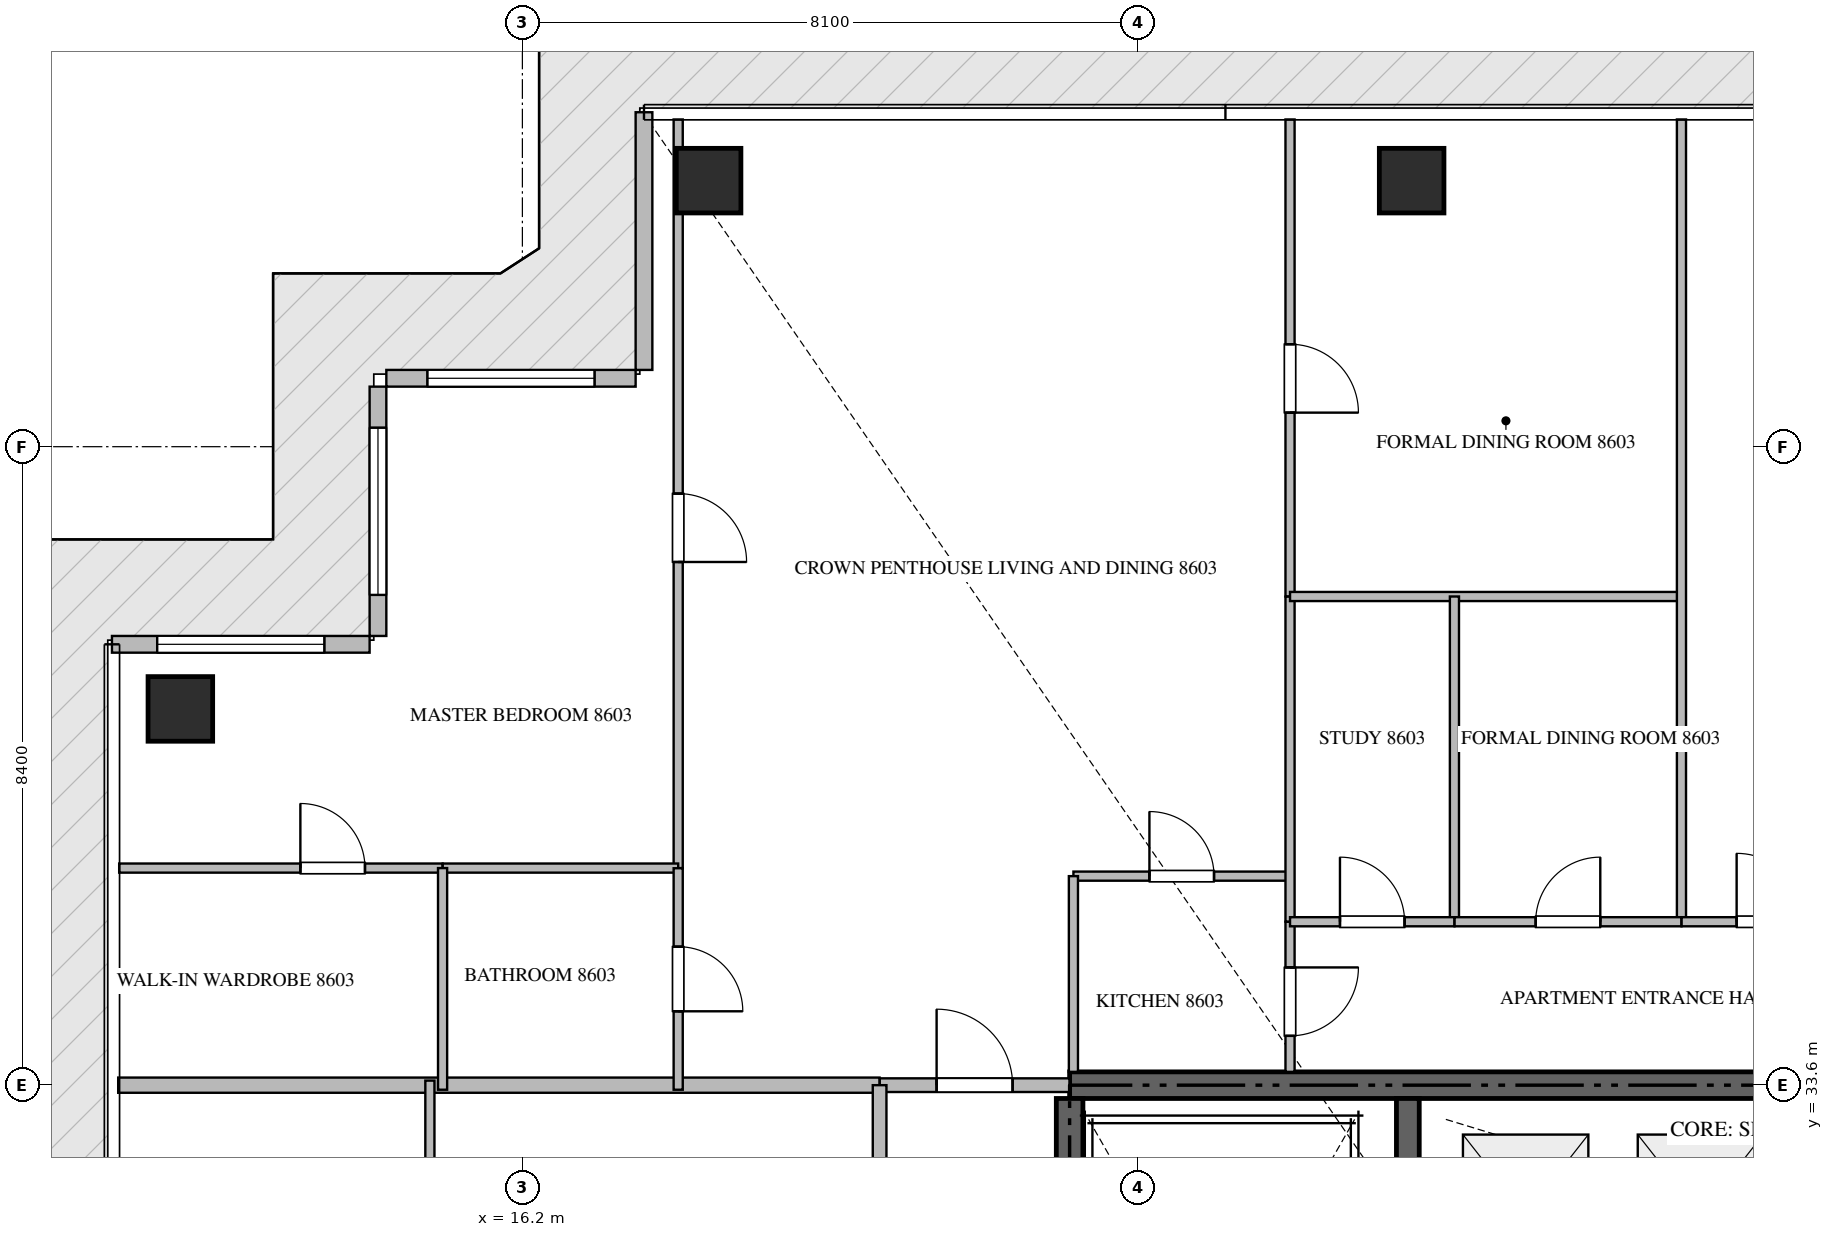
"""IFC4 building model, lengths in metres.
Left out: names, types, materials, properties, quantities, classifications, styles, units other than length and angle.
Written with IfcOpenShell. Run it as: python <this file> out.ifc"""

import sys

from ifc_helpers import new_model, si_unit, direction, frame, frame_2d, origin, origin_2d, place, context, subcontext, project, spatial, rectangle, extrude, source, transform, mapped, element, fill, save


model = new_model("IFC4")
c1 = context("Model", 3, precision=1e-05, world=origin(), true_north=direction((0.0, 1.0)))
c2 = subcontext(c1, "Body", "Model", "MODEL_VIEW")
j1 = project(units=[si_unit("LENGTHUNIT", "METRE"), si_unit("PLANEANGLEUNIT", "RADIAN")], contexts=[c1])
p1 = place(None, origin())
s1 = spatial("IfcSite", under=j1, at=p1, CompositionType="ELEMENT")
p2 = place(p1, origin())
s2 = spatial("IfcBuilding", under=s1, at=p2, CompositionType="ELEMENT")
p3 = place(p2, frame((0.0, 0.0, 347.95)))
s3 = spatial("IfcBuildingStorey", under=s2, at=p3, CompositionType="ELEMENT", Elevation=347.95)
p4 = place(p3, frame((41.4, 33.6, -0.26), z_axis=(0.0, 0.0, 1.0), x_axis=(-1.0, 0.0, 0.0)))
e1 = element("IfcWall", 1, at=p4, inside=s3, PredefinedType="SHEAR", context=c2, shape_type="SweptSolid", body=[
    extrude(rectangle(XDim=18.0, YDim=0.35, at=frame_2d((9.0, 0.0))), origin(), (0.0, 0.0, 1.0), 5.898),
])
p5 = place(p3, frame((23.4, 24.25, -0.26), z_axis=(0.0, 0.0, 1.0), x_axis=(0.0, 1.0, 0.0)))
e2 = element("IfcWall", 2, at=p5, inside=s3, PredefinedType="SHEAR", context=c2, shape_type="SweptSolid", body=[
    extrude(rectangle(XDim=9.175, YDim=0.35, at=frame_2d((4.587, 0.0))), origin(), (0.0, 0.0, 1.0), 5.898),
])
p6 = place(p3, frame((27.85, 23.55, -0.26), z_axis=(0.0, 0.0, 1.0), x_axis=(0.0, 1.0, 0.0)))
e3 = element("IfcWall", 3, at=p6, inside=s3, PredefinedType="SHEAR", context=c2, shape_type="SweptSolid", body=[
    extrude(rectangle(XDim=9.875, YDim=0.3, at=frame_2d((4.938, 0.0))), origin(), (0.0, 0.0, 1.0), 5.898),
])
m1 = source(origin(), c2, "Body", "SweptSolid", [
    extrude(rectangle(XDim=0.85, YDim=0.85, at=origin_2d()), origin(), (0.0, 0.0, 1.0), 5.9),
])
for number, where, z_axis, x_axis in (
    (4, (18.65, 45.5, -0.26), (0.0, 0.0, 1.0), (1.0, 0.0, 0.0)),
    (5, (27.9, 45.5, -0.26), (0.0, 0.0, 1.0), (1.0, 0.0, 0.0)),
    (6, (11.7, 38.55, -0.26), (0.0, 0.0, 1.0), (1.0, 0.0, 0.0)),
):
    element("IfcColumn", number, at=place(p3, frame(where, z_axis=z_axis, x_axis=x_axis)), inside=s3, PredefinedType="COLUMN", context=c2, shape_type="MappedRepresentation", body=[
        mapped(m1, transform((0.0, 0.0, 0.0), scale=1.0)),
    ])
p7 = place(p3, frame((17.8, 46.4, 0.0), z_axis=(0.0, 0.0, 1.0), x_axis=(0.0, -1.0, 0.0)))
e7 = element("IfcWall", 7, at=p7, inside=s3, PredefinedType="ELEMENTEDWALL", context=c2, shape_type="SweptSolid", body=[
    extrude(rectangle(XDim=3.39, YDim=0.22, at=frame_2d((1.695, 0.0))), origin(), (0.0, 0.0, 1.0), 5.625),
])
p8 = place(p3, frame((17.69, 42.9, 0.0), z_axis=(0.0, 0.0, 1.0), x_axis=(-1.0, 0.0, 0.0)))
e8 = element("IfcWall", 8, at=p8, inside=s3, PredefinedType="ELEMENTEDWALL", context=c2, shape_type="SweptSolid", body=[
    extrude(rectangle(XDim=3.28, YDim=0.22, at=frame_2d((1.64, 0.0))), origin(), (0.0, 0.0, 1.0), 5.625),
])
p9 = place(p8, frame((0.54, 0.0, 0.65)))
e9 = element("IfcOpeningElement", 9, at=p9, cuts=e8, PredefinedType="OPENING", context=c2, shape_type="SweptSolid", body=[
    extrude(rectangle(XDim=2.2, YDim=2.4, at=frame_2d((1.1, 1.2))), frame((0.0, 0.12, 0.0), z_axis=(0.0, -1.0, 0.0), x_axis=(1.0, 0.0, 0.0)), (0.0, 0.0, 1.0), 0.24),
])
p10 = place(p3, frame((14.3, 42.79, 0.0), z_axis=(0.0, 0.0, 1.0), x_axis=(0.0, -1.0, 0.0)))
e10 = element("IfcWall", 10, at=p10, inside=s3, PredefinedType="ELEMENTEDWALL", context=c2, shape_type="SweptSolid", body=[
    extrude(rectangle(XDim=3.28, YDim=0.22, at=frame_2d((1.64, 0.0))), origin(), (0.0, 0.0, 1.0), 5.625),
])
p11 = place(p10, frame((0.54, 0.0, 0.65)))
e11 = element("IfcOpeningElement", 11, at=p11, cuts=e10, PredefinedType="OPENING", context=c2, shape_type="SweptSolid", body=[
    extrude(rectangle(XDim=2.2, YDim=2.4, at=frame_2d((1.1, 1.2))), frame((0.0, 0.12, 0.0), z_axis=(0.0, -1.0, 0.0), x_axis=(1.0, 0.0, 0.0)), (0.0, 0.0, 1.0), 0.24),
])
p12 = place(p3, frame((14.19, 39.4, 0.0), z_axis=(0.0, 0.0, 1.0), x_axis=(-1.0, 0.0, 0.0)))
e12 = element("IfcWall", 12, at=p12, inside=s3, PredefinedType="ELEMENTEDWALL", context=c2, shape_type="SweptSolid", body=[
    extrude(rectangle(XDim=3.39, YDim=0.22, at=frame_2d((1.695, 0.0))), origin(), (0.0, 0.0, 1.0), 5.625),
])
p13 = place(p12, frame((0.595, 0.0, 0.65)))
e13 = element("IfcOpeningElement", 13, at=p13, cuts=e12, PredefinedType="OPENING", context=c2, shape_type="SweptSolid", body=[
    extrude(rectangle(XDim=2.2, YDim=2.4, at=frame_2d((1.1, 1.2))), frame((0.0, 0.12, 0.0), z_axis=(0.0, -1.0, 0.0), x_axis=(1.0, 0.0, 0.0)), (0.0, 0.0, 1.0), 0.24),
])
p14 = place(p3, frame((10.882, 33.6, 0.0), z_axis=(0.0, 0.0, 1.0), x_axis=(1.0, 0.0, 0.0)))
e14 = element("IfcWall", 14, at=p14, inside=s3, PredefinedType="PARTITIONING", context=c2, shape_type="SweptSolid", body=[
    extrude(rectangle(XDim=10.018, YDim=0.2, at=frame_2d((5.009, 0.0))), origin(), (0.0, 0.0, 1.0), 5.64),
])
p15 = place(p3, frame((20.902, 33.6, 0.0), z_axis=(0.0, 0.0, 1.0), x_axis=(1.0, 0.0, 0.0)))
e15 = element("IfcWall", 15, at=p15, inside=s3, PredefinedType="PARTITIONING", context=c2, shape_type="SweptSolid", body=[
    extrude(rectangle(XDim=2.496, YDim=0.18, at=frame_2d((1.248, 0.0))), origin(), (0.0, 0.0, 1.0), 5.64),
])
p16 = place(p15, frame((0.748, 0.0, 0.0)))
e16 = element("IfcOpeningElement", 16, at=p16, cuts=e15, PredefinedType="OPENING", context=c2, shape_type="SweptSolid", body=[
    extrude(rectangle(XDim=1.0, YDim=2.15, at=frame_2d((0.5, 1.075))), frame((0.0, 0.1, 0.0), z_axis=(0.0, -1.0, 0.0), x_axis=(1.0, 0.0, 0.0)), (0.0, 0.0, 1.0), 0.2),
])
p17 = place(p3, frame((20.9, 16.8, 0.0), z_axis=(0.0, 0.0, 1.0), x_axis=(0.0, 1.0, 0.0)))
e17 = element("IfcWall", 17, at=p17, inside=s3, PredefinedType="PARTITIONING", context=c2, shape_type="SweptSolid", body=[
    extrude(rectangle(XDim=16.8, YDim=0.18, at=frame_2d((8.4, 0.0))), origin(), (0.0, 0.0, 1.0), 5.64),
])
p18 = place(p17, frame((1.3, 0.0, 0.0)))
e18 = element("IfcOpeningElement", 18, at=p18, cuts=e17, PredefinedType="OPENING", context=c2, shape_type="SweptSolid", body=[
    extrude(rectangle(XDim=1.0, YDim=2.15, at=frame_2d((0.5, 1.075))), frame((0.0, 0.1, 0.0), z_axis=(0.0, -1.0, 0.0), x_axis=(1.0, 0.0, 0.0)), (0.0, 0.0, 1.0), 0.2),
])
p19 = place(p3, frame((23.45, 36.35, 0.0), z_axis=(0.0, 0.0, 1.0), x_axis=(1.0, 0.0, 0.0)))
e19 = element("IfcWall", 19, at=p19, inside=s3, PredefinedType="PARTITIONING", context=c2, shape_type="SweptSolid", body=[
    extrude(rectangle(XDim=2.85, YDim=0.12, at=frame_2d((1.425, 0.0))), origin(), (0.0, 0.0, 1.0), 5.64),
])
p20 = place(p19, frame((1.0, 0.0, 0.0)))
e20 = element("IfcOpeningElement", 20, at=p20, cuts=e19, PredefinedType="OPENING", context=c2, shape_type="SweptSolid", body=[
    extrude(rectangle(XDim=0.85, YDim=2.1, at=frame_2d((0.425, 1.05))), frame((0.0, 0.07, 0.0), z_axis=(0.0, -1.0, 0.0), x_axis=(1.0, 0.0, 0.0)), (0.0, 0.0, 1.0), 0.14),
])
p21 = place(p3, frame((23.45, 36.35, 0.0), z_axis=(0.0, 0.0, 1.0), x_axis=(0.0, -1.0, 0.0)))
e21 = element("IfcWall", 21, at=p21, inside=s3, PredefinedType="PARTITIONING", context=c2, shape_type="SweptSolid", body=[
    extrude(rectangle(XDim=2.575, YDim=0.12, at=frame_2d((1.288, 0.0))), origin(), (0.0, 0.0, 1.0), 5.64),
])
p22 = place(p3, frame((18.25, 46.305, 0.0), z_axis=(0.0, 0.0, 1.0), x_axis=(0.0, -1.0, 0.0)))
e22 = element("IfcWall", 22, at=p22, inside=s3, PredefinedType="PARTITIONING", context=c2, shape_type="SweptSolid", body=[
    extrude(rectangle(XDim=9.849, YDim=0.12, at=frame_2d((4.924, 0.0))), origin(), (0.0, 0.0, 1.0), 5.64),
])
p23 = place(p22, frame((4.922, 0.0, 0.0)))
e23 = element("IfcOpeningElement", 23, at=p23, cuts=e22, PredefinedType="OPENING", context=c2, shape_type="SweptSolid", body=[
    extrude(rectangle(XDim=0.9, YDim=2.1, at=frame_2d((0.45, 1.05))), frame((0.0, 0.07, 0.0), z_axis=(0.0, -1.0, 0.0), x_axis=(1.0, 0.0, 0.0)), (0.0, 0.0, 1.0), 0.14),
])
p24 = place(p3, frame((10.895, 36.456, 0.0), z_axis=(0.0, 0.0, 1.0), x_axis=(1.0, 0.0, 0.0)))
e24 = element("IfcWall", 24, at=p24, inside=s3, PredefinedType="PARTITIONING", context=c2, shape_type="SweptSolid", body=[
    extrude(rectangle(XDim=4.255, YDim=0.12, at=frame_2d((2.127, 0.0))), origin(), (0.0, 0.0, 1.0), 5.64),
])
p25 = place(p24, frame((2.384, 0.0, 0.0)))
e25 = element("IfcOpeningElement", 25, at=p25, cuts=e24, PredefinedType="OPENING", context=c2, shape_type="SweptSolid", body=[
    extrude(rectangle(XDim=0.85, YDim=2.1, at=frame_2d((0.425, 1.05))), frame((0.0, 0.07, 0.0), z_axis=(0.0, -1.0, 0.0), x_axis=(1.0, 0.0, 0.0)), (0.0, 0.0, 1.0), 0.14),
])
p26 = place(p3, frame((15.152, 36.456, 0.0), z_axis=(0.0, 0.0, 1.0), x_axis=(1.0, 0.0, 0.0)))
e26 = element("IfcWall", 26, at=p26, inside=s3, PredefinedType="PARTITIONING", context=c2, shape_type="SweptSolid", body=[
    extrude(rectangle(XDim=3.098, YDim=0.12, at=frame_2d((1.549, 0.0))), origin(), (0.0, 0.0, 1.0), 5.64),
])
p27 = place(p3, frame((15.15, 36.456, 0.0), z_axis=(0.0, 0.0, 1.0), x_axis=(0.0, -1.0, 0.0)))
e27 = element("IfcWall", 27, at=p27, inside=s3, PredefinedType="PARTITIONING", context=c2, shape_type="SweptSolid", body=[
    extrude(rectangle(XDim=2.916, YDim=0.12, at=frame_2d((1.458, 0.0))), origin(), (0.0, 0.0, 1.0), 5.64),
])
p28 = place(p3, frame((18.25, 36.454, 0.0), z_axis=(0.0, 0.0, 1.0), x_axis=(0.0, -1.0, 0.0)))
e28 = element("IfcWall", 28, at=p28, inside=s3, PredefinedType="PARTITIONING", context=c2, shape_type="SweptSolid", body=[
    extrude(rectangle(XDim=2.914, YDim=0.12, at=frame_2d((1.457, 0.0))), origin(), (0.0, 0.0, 1.0), 5.64),
])
p29 = place(p28, frame((1.032, 0.0, 0.0)))
e29 = element("IfcOpeningElement", 29, at=p29, cuts=e28, PredefinedType="OPENING", context=c2, shape_type="SweptSolid", body=[
    extrude(rectangle(XDim=0.85, YDim=2.1, at=frame_2d((0.425, 1.05))), frame((0.0, 0.07, 0.0), z_axis=(0.0, -1.0, 0.0), x_axis=(1.0, 0.0, 0.0)), (0.0, 0.0, 1.0), 0.14),
])
p30 = place(p3, frame((26.3, 35.75, 0.0), z_axis=(0.0, 0.0, 1.0), x_axis=(0.0, -1.0, 0.0)))
e30 = element("IfcWall", 30, at=p30, inside=s3, PredefinedType="PARTITIONING", context=c2, shape_type="SweptSolid", body=[
    extrude(rectangle(XDim=1.975, YDim=0.12, at=frame_2d((0.988, 0.0))), origin(), (0.0, 0.0, 1.0), 5.64),
])
p31 = place(p30, frame((0.601, 0.0, 0.0)))
e31 = element("IfcOpeningElement", 31, at=p31, cuts=e30, PredefinedType="OPENING", context=c2, shape_type="SweptSolid", body=[
    extrude(rectangle(XDim=0.9, YDim=2.1, at=frame_2d((0.45, 1.05))), frame((0.0, 0.07, 0.0), z_axis=(0.0, -1.0, 0.0), x_axis=(1.0, 0.0, 0.0)), (0.0, 0.0, 1.0), 0.14),
])
p32 = place(p3, frame((26.3, 46.305, 0.0), z_axis=(0.0, 0.0, 1.0), x_axis=(0.0, -1.0, 0.0)))
e32 = element("IfcWall", 32, at=p32, inside=s3, PredefinedType="PARTITIONING", context=c2, shape_type="SweptSolid", body=[
    extrude(rectangle(XDim=6.276, YDim=0.12, at=frame_2d((3.138, 0.0))), origin(), (0.0, 0.0, 1.0), 5.64),
])
p33 = place(p32, frame((2.957, 0.0, 0.0)))
e33 = element("IfcOpeningElement", 33, at=p33, cuts=e32, PredefinedType="OPENING", context=c2, shape_type="SweptSolid", body=[
    extrude(rectangle(XDim=0.9, YDim=2.1, at=frame_2d((0.45, 1.05))), frame((0.0, 0.07, 0.0), z_axis=(0.0, -1.0, 0.0), x_axis=(1.0, 0.0, 0.0)), (0.0, 0.0, 1.0), 0.14),
])
p34 = place(p3, frame((26.3, 40.027, 0.0), z_axis=(0.0, 0.0, 1.0), x_axis=(0.0, -1.0, 0.0)))
e34 = element("IfcWall", 34, at=p34, inside=s3, PredefinedType="PARTITIONING", context=c2, shape_type="SweptSolid", body=[
    extrude(rectangle(XDim=4.275, YDim=0.12, at=frame_2d((2.138, 0.0))), origin(), (0.0, 0.0, 1.0), 5.64),
])
p35 = place(p3, frame((26.3, 40.029, 0.0), z_axis=(0.0, 0.0, 1.0), x_axis=(1.0, 0.0, 0.0)))
e35 = element("IfcWall", 35, at=p35, inside=s3, PredefinedType="PARTITIONING", context=c2, shape_type="SweptSolid", body=[
    extrude(rectangle(XDim=5.15, YDim=0.12, at=frame_2d((2.575, 0.0))), origin(), (0.0, 0.0, 1.0), 5.64),
])
p36 = place(p3, frame((31.45, 46.305, 0.0), z_axis=(0.0, 0.0, 1.0), x_axis=(0.0, -1.0, 0.0)))
e36 = element("IfcWall", 36, at=p36, inside=s3, PredefinedType="PARTITIONING", context=c2, shape_type="SweptSolid", body=[
    extrude(rectangle(XDim=10.555, YDim=0.12, at=frame_2d((5.277, 0.0))), origin(), (0.0, 0.0, 1.0), 5.64),
])
p37 = place(p3, frame((28.463, 40.029, 0.0), z_axis=(0.0, 0.0, 1.0), x_axis=(0.0, -1.0, 0.0)))
e37 = element("IfcWall", 37, at=p37, inside=s3, PredefinedType="PARTITIONING", context=c2, shape_type="SweptSolid", body=[
    extrude(rectangle(XDim=4.279, YDim=0.12, at=frame_2d((2.14, 0.0))), origin(), (0.0, 0.0, 1.0), 5.64),
])
p38 = place(p3, frame((26.3, 35.75, 0.0), z_axis=(0.0, 0.0, 1.0), x_axis=(1.0, 0.0, 0.0)))
e38 = element("IfcWall", 38, at=p38, inside=s3, PredefinedType="PARTITIONING", context=c2, shape_type="SweptSolid", body=[
    extrude(rectangle(XDim=2.163, YDim=0.12, at=frame_2d((1.082, 0.0))), origin(), (0.0, 0.0, 1.0), 5.64),
])
p39 = place(p38, frame((0.657, 0.0, 0.0)))
e39 = element("IfcOpeningElement", 39, at=p39, cuts=e38, PredefinedType="OPENING", context=c2, shape_type="SweptSolid", body=[
    extrude(rectangle(XDim=0.85, YDim=2.1, at=frame_2d((0.425, 1.05))), frame((0.0, 0.07, 0.0), z_axis=(0.0, -1.0, 0.0), x_axis=(1.0, 0.0, 0.0)), (0.0, 0.0, 1.0), 0.14),
])
p40 = place(p3, frame((28.465, 35.75, 0.0), z_axis=(0.0, 0.0, 1.0), x_axis=(1.0, 0.0, 0.0)))
e40 = element("IfcWall", 40, at=p40, inside=s3, PredefinedType="PARTITIONING", context=c2, shape_type="SweptSolid", body=[
    extrude(rectangle(XDim=2.985, YDim=0.12, at=frame_2d((1.492, 0.0))), origin(), (0.0, 0.0, 1.0), 5.64),
])
p41 = place(p40, frame((1.067, 0.0, 0.0)))
e41 = element("IfcOpeningElement", 41, at=p41, cuts=e40, PredefinedType="OPENING", context=c2, shape_type="SweptSolid", body=[
    extrude(rectangle(XDim=0.85, YDim=2.1, at=frame_2d((0.425, 1.05))), frame((0.0, 0.07, 0.0), z_axis=(0.0, -1.0, 0.0), x_axis=(1.0, 0.0, 0.0)), (0.0, 0.0, 1.0), 0.14),
])
p42 = place(p3, frame((31.452, 35.75, 0.0), z_axis=(0.0, 0.0, 1.0), x_axis=(1.0, 0.0, 0.0)))
e42 = element("IfcWall", 42, at=p42, inside=s3, PredefinedType="PARTITIONING", context=c2, shape_type="SweptSolid", body=[
    extrude(rectangle(XDim=2.348, YDim=0.12, at=frame_2d((1.174, 0.0))), origin(), (0.0, 0.0, 1.0), 5.64),
])
p43 = place(p42, frame((0.724, 0.0, 0.0)))
e43 = element("IfcOpeningElement", 43, at=p43, cuts=e42, PredefinedType="OPENING", context=c2, shape_type="SweptSolid", body=[
    extrude(rectangle(XDim=0.9, YDim=2.1, at=frame_2d((0.45, 1.05))), frame((0.0, 0.07, 0.0), z_axis=(0.0, -1.0, 0.0), x_axis=(1.0, 0.0, 0.0)), (0.0, 0.0, 1.0), 0.14),
])
p44 = place(p3, frame((14.983, 23.18, 0.0), z_axis=(0.0, 0.0, 1.0), x_axis=(0.0, 1.0, 0.0)))
e44 = element("IfcWall", 44, at=p44, inside=s3, PredefinedType="PARTITIONING", context=c2, shape_type="SweptSolid", body=[
    extrude(rectangle(XDim=10.48, YDim=0.12, at=frame_2d((5.24, 0.0))), origin(), (0.0, 0.0, 1.0), 5.64),
])
m2 = source(origin(), c2, "Body", "SweptSolid", [
    extrude(rectangle(XDim=2.2, YDim=2.4, at=frame_2d((1.1, 1.2))), frame((0.0, 0.03, 0.0), z_axis=(0.0, -1.0, 0.0), x_axis=(1.0, 0.0, 0.0)), (0.0, 0.0, 1.0), 0.06),
])
p45 = place(p9, origin())
e45 = element("IfcWindow", 45, at=p45, inside=s3, PartitioningType="SINGLE_PANEL", PredefinedType="WINDOW", context=c2, shape_type="MappedRepresentation", body=[
    mapped(m2, transform((0.0, 0.0, 0.0), scale=1.0)),
])
fill(e9, e45)
p46 = place(p11, origin())
e46 = element("IfcWindow", 46, at=p46, inside=s3, PartitioningType="SINGLE_PANEL", PredefinedType="WINDOW", context=c2, shape_type="MappedRepresentation", body=[
    mapped(m2, transform((0.0, 0.0, 0.0), scale=1.0)),
])
fill(e11, e46)
p47 = place(p13, origin())
e47 = element("IfcWindow", 47, at=p47, inside=s3, PartitioningType="SINGLE_PANEL", PredefinedType="WINDOW", context=c2, shape_type="MappedRepresentation", body=[
    mapped(m2, transform((0.0, 0.0, 0.0), scale=1.0)),
])
fill(e13, e47)
m3 = source(origin(), c2, "Body", "SweptSolid", [
    extrude(rectangle(XDim=1.0, YDim=2.15, at=frame_2d((0.5, 1.075))), frame((0.0, 0.025, 0.0), z_axis=(0.0, -1.0, 0.0), x_axis=(1.0, 0.0, 0.0)), (0.0, 0.0, 1.0), 0.05),
])
p48 = place(p16, origin())
e48 = element("IfcDoor", 48, at=p48, inside=s3, OperationType="SINGLE_SWING_LEFT", PredefinedType="DOOR", context=c2, shape_type="MappedRepresentation", body=[
    mapped(m3, transform((0.0, 0.0, 0.0), scale=1.0)),
])
fill(e16, e48)
m4 = source(origin(), c2, "Body", "SweptSolid", [
    extrude(rectangle(XDim=0.85, YDim=2.1, at=frame_2d((0.425, 1.05))), frame((0.0, 0.025, 0.0), z_axis=(0.0, -1.0, 0.0), x_axis=(1.0, 0.0, 0.0)), (0.0, 0.0, 1.0), 0.05),
])
p49 = place(p20, origin())
e49 = element("IfcDoor", 49, at=p49, inside=s3, OperationType="SINGLE_SWING_LEFT", PredefinedType="DOOR", context=c2, shape_type="MappedRepresentation", body=[
    mapped(m4, transform((0.0, 0.0, 0.0), scale=1.0)),
])
fill(e20, e49)
m5 = source(origin(), c2, "Body", "SweptSolid", [
    extrude(rectangle(XDim=0.9, YDim=2.1, at=frame_2d((0.45, 1.05))), frame((0.0, 0.025, 0.0), z_axis=(0.0, -1.0, 0.0), x_axis=(1.0, 0.0, 0.0)), (0.0, 0.0, 1.0), 0.05),
])
p50 = place(p23, origin())
e50 = element("IfcDoor", 50, at=p50, inside=s3, OperationType="SINGLE_SWING_RIGHT", PredefinedType="DOOR", context=c2, shape_type="MappedRepresentation", body=[
    mapped(m5, transform((0.0, 0.0, 0.0), scale=1.0)),
])
fill(e23, e50)
p51 = place(p25, origin())
e51 = element("IfcDoor", 51, at=p51, inside=s3, OperationType="SINGLE_SWING_LEFT", PredefinedType="DOOR", context=c2, shape_type="MappedRepresentation", body=[
    mapped(m4, transform((0.0, 0.0, 0.0), scale=1.0)),
])
fill(e25, e51)
p52 = place(p29, origin())
e52 = element("IfcDoor", 52, at=p52, inside=s3, OperationType="SINGLE_SWING_RIGHT", PredefinedType="DOOR", context=c2, shape_type="MappedRepresentation", body=[
    mapped(m4, transform((0.0, 0.0, 0.0), scale=1.0)),
])
fill(e29, e52)
p53 = place(p31, origin())
e53 = element("IfcDoor", 53, at=p53, inside=s3, OperationType="SINGLE_SWING_LEFT", PredefinedType="DOOR", context=c2, shape_type="MappedRepresentation", body=[
    mapped(m5, transform((0.0, 0.0, 0.0), scale=1.0)),
])
fill(e31, e53)
p54 = place(p33, origin())
e54 = element("IfcDoor", 54, at=p54, inside=s3, OperationType="SINGLE_SWING_RIGHT", PredefinedType="DOOR", context=c2, shape_type="MappedRepresentation", body=[
    mapped(m5, transform((0.0, 0.0, 0.0), scale=1.0)),
])
fill(e33, e54)
p55 = place(p39, origin())
e55 = element("IfcDoor", 55, at=p55, inside=s3, OperationType="SINGLE_SWING_LEFT", PredefinedType="DOOR", context=c2, shape_type="MappedRepresentation", body=[
    mapped(m4, transform((0.0, 0.0, 0.0), scale=1.0)),
])
fill(e39, e55)
p56 = place(p41, origin())
e56 = element("IfcDoor", 56, at=p56, inside=s3, OperationType="SINGLE_SWING_RIGHT", PredefinedType="DOOR", context=c2, shape_type="MappedRepresentation", body=[
    mapped(m4, transform((0.0, 0.0, 0.0), scale=1.0)),
])
fill(e41, e56)
p57 = place(p43, origin())
e57 = element("IfcDoor", 57, at=p57, inside=s3, OperationType="SINGLE_SWING_LEFT", PredefinedType="DOOR", context=c2, shape_type="MappedRepresentation", body=[
    mapped(m5, transform((0.0, 0.0, 0.0), scale=1.0)),
])
fill(e43, e57)
save(model, sys.argv[1])
